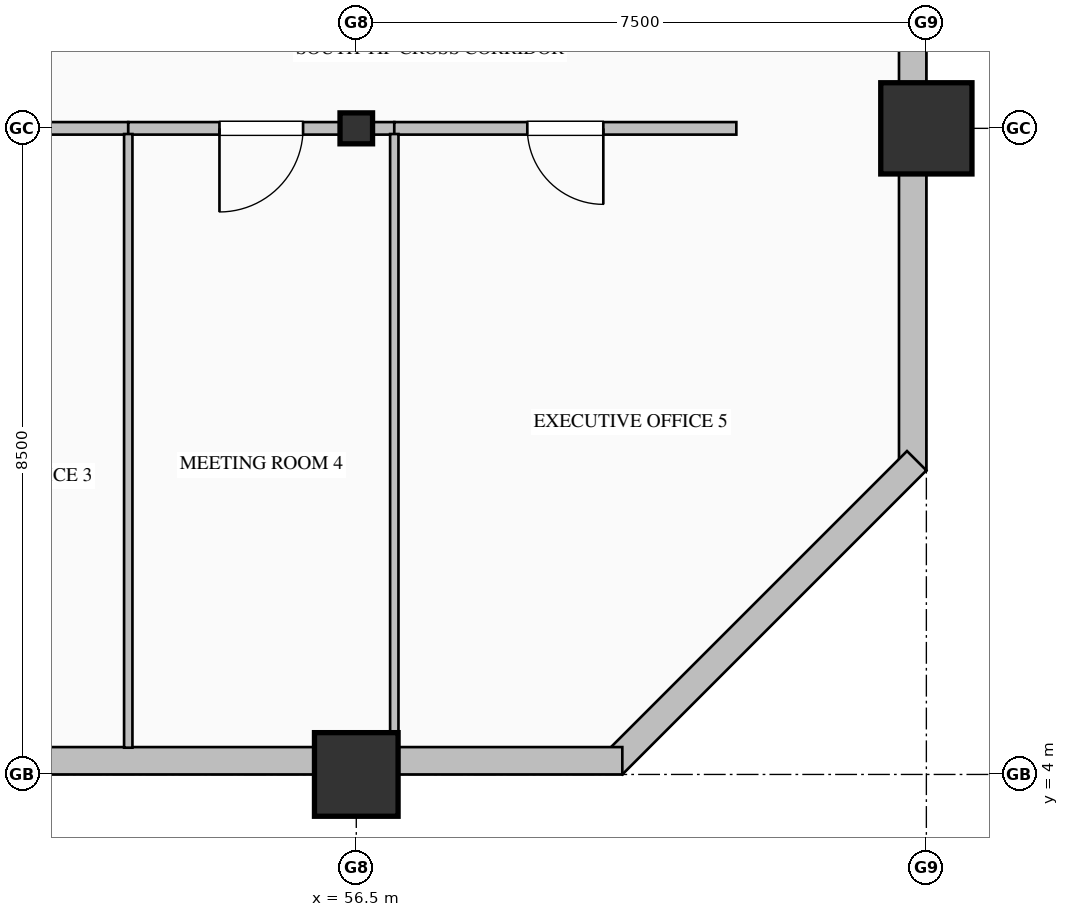
"""IFC4 building model, lengths in metres.
Left out: names, types, materials, properties, quantities, classifications, styles, units other than length and angle.
Written with IfcOpenShell. Run it as: python <this file> out.ifc"""

import sys

from ifc_helpers import new_model, si_unit, direction, frame, frame_2d, origin, origin_2d, place, context, subcontext, project, spatial, rectangle, hollow_rectangle, hollow_circle, i_section, extrude, element, fill, save


model = new_model("IFC4")
c1 = context("Model", 3, precision=1e-05, world=origin(), true_north=direction((0.0, 1.0)))
c2 = subcontext(c1, "Body", "Model", "MODEL_VIEW")
j1 = project(units=[si_unit("LENGTHUNIT", "METRE"), si_unit("PLANEANGLEUNIT", "RADIAN")], contexts=[c1])
p1 = place(None, origin())
s1 = spatial("IfcSite", under=j1, at=p1, CompositionType="ELEMENT")
p2 = place(p1, origin())
s2 = spatial("IfcBuilding", under=s1, at=p2, CompositionType="ELEMENT")
p3 = place(p2, frame((0.0, 0.0, 32.2)))
s3 = spatial("IfcBuildingStorey", under=s2, at=p3, CompositionType="ELEMENT", Elevation=32.2)
p4 = place(p3, frame((56.5, 4.0, 0.0), z_axis=(0.0, 0.0, 1.0), x_axis=(1.0, 0.0, 0.0)))
e1 = element("IfcColumn", 1, at=p4, inside=s3, PredefinedType="COLUMN", context=c2, shape_type="SweptSolid", body=[
    extrude(hollow_rectangle(XDim=1.1, YDim=1.1, WallThickness=0.04, at=origin_2d()), origin(), (0.0, 0.0, 1.0), 4.0),
])
p5 = place(p3, frame((56.5, 12.5, 0.0), z_axis=(0.0, 0.0, 1.0), x_axis=(1.0, 0.0, 0.0)))
e2 = element("IfcColumn", 2, at=p5, inside=s3, PredefinedType="COLUMN", context=c2, shape_type="SweptSolid", body=[
    extrude(i_section(OverallWidth=0.407, OverallDepth=0.428, WebThickness=0.02, FlangeThickness=0.035, FilletRadius=0.022, at=origin_2d()), origin(), (0.0, 0.0, 1.0), 4.0),
])
p6 = place(p3, frame((64.0, 12.5, 0.0), z_axis=(0.0, 0.0, 1.0), x_axis=(1.0, 0.0, 0.0)))
e3 = element("IfcColumn", 3, at=p6, inside=s3, PredefinedType="COLUMN", context=c2, shape_type="SweptSolid", body=[
    extrude(hollow_circle(Radius=0.6, WallThickness=0.04, at=origin_2d()), origin(), (0.0, 0.0, 1.0), 4.0),
])
p7 = place(p3, frame((63.82, 36.05, 0.0), z_axis=(0.0, 0.0, 1.0), x_axis=(0.0, -1.0, 0.0)))
e4 = element("IfcWall", 4, at=p7, inside=s3, PredefinedType="SOLIDWALL", context=c2, shape_type="SweptSolid", body=[
    extrude(rectangle(XDim=28.05, YDim=0.36, at=frame_2d((14.025, 0.0))), origin(), (0.0, 0.0, 1.0), 3.25),
])
p8 = place(p7, frame((9.9, 0.0, 0.85)))
e5 = element("IfcOpeningElement", 5, at=p8, cuts=e4, PredefinedType="OPENING", context=c2, shape_type="SweptSolid", body=[
    extrude(rectangle(XDim=1.8, YDim=2.05, at=frame_2d((0.9, 1.025))), frame((0.0, 0.19, 0.0), z_axis=(0.0, -1.0, 0.0), x_axis=(1.0, 0.0, 0.0)), (0.0, 0.0, 1.0), 0.38),
])
p9 = place(p7, frame((13.35, 0.0, 0.85)))
e6 = element("IfcOpeningElement", 6, at=p9, cuts=e4, PredefinedType="OPENING", context=c2, shape_type="SweptSolid", body=[
    extrude(rectangle(XDim=2.1, YDim=2.05, at=frame_2d((1.05, 1.025))), frame((0.0, 0.19, 0.0), z_axis=(0.0, -1.0, 0.0), x_axis=(1.0, 0.0, 0.0)), (0.0, 0.0, 1.0), 0.38),
])
p10 = place(p3, frame((63.873, 8.127, 0.0), z_axis=(0.0, 0.0, 1.0), x_axis=(-0.707106781187, -0.707106781187, 0.0)))
e7 = element("IfcWall", 7, at=p10, inside=s3, PredefinedType="SOLIDWALL", context=c2, shape_type="SweptSolid", body=[
    extrude(rectangle(XDim=5.657, YDim=0.36, at=frame_2d((2.828, 0.0))), origin(), (0.0, 0.0, 1.0), 3.75),
])
p11 = place(p3, frame((60.0, 4.18, 0.0), z_axis=(0.0, 0.0, 1.0), x_axis=(-1.0, 0.0, 0.0)))
e8 = element("IfcWall", 8, at=p11, inside=s3, PredefinedType="SOLIDWALL", context=c2, shape_type="SweptSolid", body=[
    extrude(rectangle(XDim=15.5, YDim=0.36, at=frame_2d((7.75, 0.0))), origin(), (0.0, 0.0, 1.0), 3.25),
])
p12 = place(p3, frame((53.5, 12.5, 0.0), z_axis=(0.0, 0.0, 1.0), x_axis=(-1.0, 0.0, 0.0)))
e9 = element("IfcWall", 9, at=p12, inside=s3, PredefinedType="PARTITIONING", context=c2, shape_type="SweptSolid", body=[
    extrude(rectangle(XDim=3.5, YDim=0.165, at=frame_2d((1.75, 0.0))), origin(), (0.0, 0.0, 1.0), 3.042),
])
p13 = place(p12, frame((1.25, 0.0, 0.0)))
e10 = element("IfcOpeningElement", 10, at=p13, cuts=e9, PredefinedType="OPENING", context=c2, shape_type="SweptSolid", body=[
    extrude(rectangle(XDim=1.0, YDim=2.15, at=frame_2d((0.5, 1.075))), frame((0.0, 0.093, 0.0), z_axis=(0.0, -1.0, 0.0), x_axis=(1.0, 0.0, 0.0)), (0.0, 0.0, 1.0), 0.185),
])
p14 = place(p3, frame((57.0, 12.5, 0.0), z_axis=(0.0, 0.0, 1.0), x_axis=(-1.0, 0.0, 0.0)))
e11 = element("IfcWall", 11, at=p14, inside=s3, PredefinedType="PARTITIONING", context=c2, shape_type="SweptSolid", body=[
    extrude(rectangle(XDim=3.5, YDim=0.165, at=frame_2d((1.75, 0.0))), origin(), (0.0, 0.0, 1.0), 3.042),
])
p15 = place(p14, frame((1.2, 0.0, 0.0)))
e12 = element("IfcOpeningElement", 12, at=p15, cuts=e11, PredefinedType="OPENING", context=c2, shape_type="SweptSolid", body=[
    extrude(rectangle(XDim=1.1, YDim=2.2, at=frame_2d((0.55, 1.1))), frame((0.0, 0.093, 0.0), z_axis=(0.0, -1.0, 0.0), x_axis=(1.0, 0.0, 0.0)), (0.0, 0.0, 1.0), 0.185),
])
p16 = place(p3, frame((61.5, 12.5, 0.0), z_axis=(0.0, 0.0, 1.0), x_axis=(-1.0, 0.0, 0.0)))
e13 = element("IfcWall", 13, at=p16, inside=s3, PredefinedType="PARTITIONING", context=c2, shape_type="SweptSolid", body=[
    extrude(rectangle(XDim=4.5, YDim=0.165, at=frame_2d((2.25, 0.0))), origin(), (0.0, 0.0, 1.0), 3.042),
])
p17 = place(p16, frame((1.75, 0.0, 0.0)))
e14 = element("IfcOpeningElement", 14, at=p17, cuts=e13, PredefinedType="OPENING", context=c2, shape_type="SweptSolid", body=[
    extrude(rectangle(XDim=1.0, YDim=2.15, at=frame_2d((0.5, 1.075))), frame((0.0, 0.093, 0.0), z_axis=(0.0, -1.0, 0.0), x_axis=(1.0, 0.0, 0.0)), (0.0, 0.0, 1.0), 0.185),
])
for number, where, z_axis, x_axis in (
    (15, (53.5, 12.426, 0.0), (0.0, 0.0, 1.0), (0.0, -1.0, 0.0)),
    (16, (57.0, 12.426, 0.0), (0.0, 0.0, 1.0), (0.0, -1.0, 0.0)),
):
    element("IfcWall", number, at=place(p3, frame(where, z_axis=z_axis, x_axis=x_axis)), inside=s3, PredefinedType="MOVABLE", context=c2, shape_type="SweptSolid", body=[
        extrude(rectangle(XDim=8.073, YDim=0.11, at=frame_2d((4.037, 0.0))), origin(), (0.0, 0.0, 1.0), 3.75),
    ])
p18 = place(p15, origin())
e17 = element("IfcDoor", 17, at=p18, inside=s3, OperationType="SINGLE_SWING_RIGHT", PredefinedType="DOOR", context=c2, shape_type="SweptSolid", body=[
    extrude(rectangle(XDim=1.1, YDim=2.2, at=frame_2d((0.55, 1.1))), frame((0.0, 0.025, 0.0), z_axis=(0.0, -1.0, 0.0), x_axis=(1.0, 0.0, 0.0)), (0.0, 0.0, 1.0), 0.05),
])
fill(e12, e17)
p19 = place(p17, origin())
e18 = element("IfcDoor", 18, at=p19, inside=s3, OperationType="SINGLE_SWING_LEFT", PredefinedType="DOOR", context=c2, shape_type="SweptSolid", body=[
    extrude(rectangle(XDim=1.0, YDim=2.15, at=frame_2d((0.5, 1.075))), frame((0.0, 0.025, 0.0), z_axis=(0.0, -1.0, 0.0), x_axis=(1.0, 0.0, 0.0)), (0.0, 0.0, 1.0), 0.05),
])
fill(e14, e18)
save(model, sys.argv[1])
